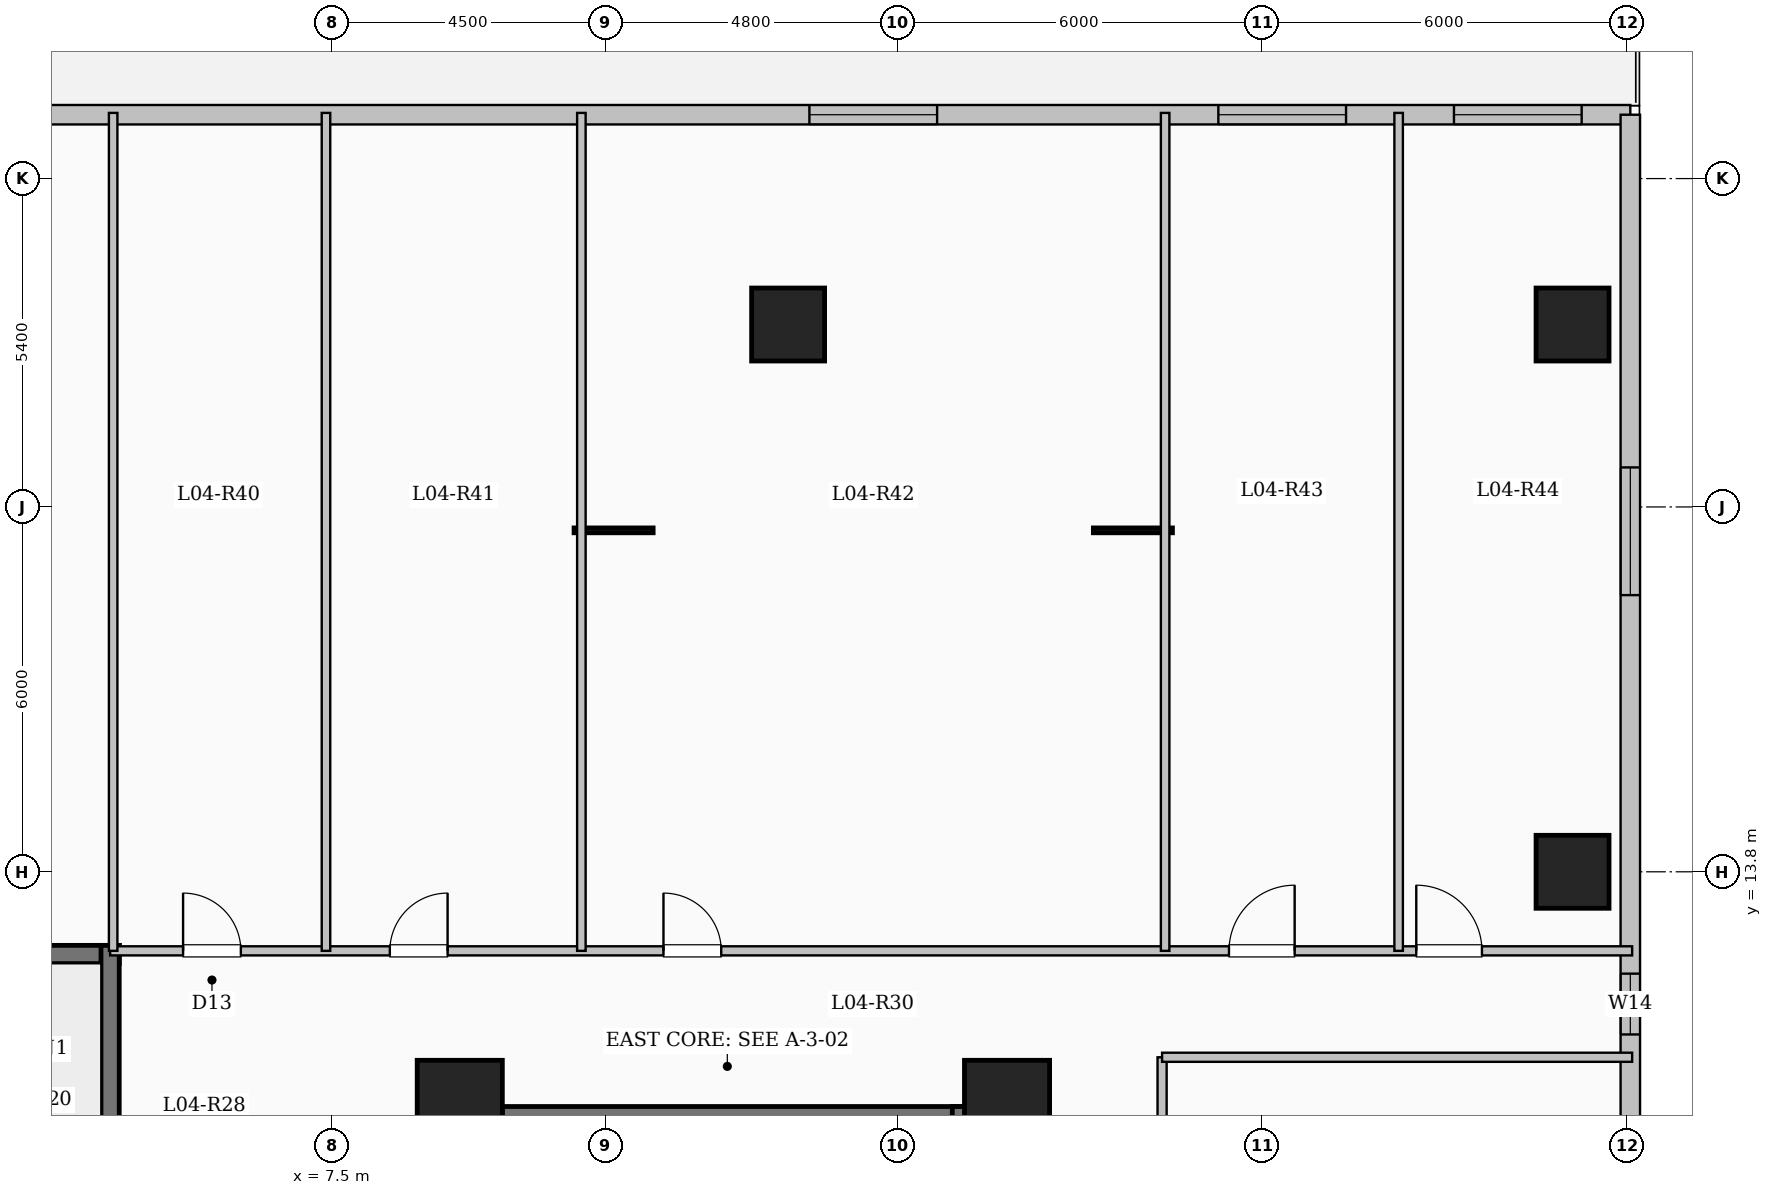
"""IFC4 building model, lengths in metres.
Left out: names, types, materials, properties, quantities, classifications, styles, units other than length and angle.
Written with IfcOpenShell. Run it as: python <this file> out.ifc"""

import sys

from ifc_helpers import new_model, si_unit, direction, frame, frame_2d, origin, origin_2d, place, context, subcontext, project, spatial, rectangle, extrude, element, fill, save


model = new_model("IFC4")
c1 = context("Model", 3, precision=1e-05, world=origin(), true_north=direction((0.0, 1.0)))
c2 = subcontext(c1, "Body", "Model", "MODEL_VIEW")
j1 = project(units=[si_unit("LENGTHUNIT", "METRE"), si_unit("PLANEANGLEUNIT", "RADIAN")], contexts=[c1])
p1 = place(None, origin())
s1 = spatial("IfcSite", under=j1, at=p1, CompositionType="ELEMENT")
p2 = place(p1, origin())
s2 = spatial("IfcBuilding", under=s1, at=p2, CompositionType="ELEMENT")
p3 = place(p2, frame((0.0, 0.0, 18.9)))
s3 = spatial("IfcBuildingStorey", under=s2, at=p3, CompositionType="ELEMENT", Elevation=18.9)
for number, where, z_axis, x_axis in (
    (1, (9.6, 10.0, 0.0), (0.0, 0.0, 1.0), (1.0, 0.0, 0.0)),
    (2, (18.6, 10.0, 0.0), (0.0, 0.0, 1.0), (1.0, 0.0, 0.0)),
):
    element("IfcColumn", number, at=place(p3, frame(where, z_axis=z_axis, x_axis=x_axis)), inside=s3, PredefinedType="COLUMN", context=c2, shape_type="SweptSolid", body=[
        extrude(rectangle(XDim=1.4, YDim=1.4, at=origin_2d()), origin(), (0.0, 0.0, 1.0), 5.1),
    ])
for number, where, z_axis, x_axis in (
    (3, (15.0, 22.8, 0.0), (0.0, 0.0, 1.0), (1.0, 0.0, 0.0)),
    (4, (27.9, 22.8, 0.0), (0.0, 0.0, 1.0), (1.0, 0.0, 0.0)),
    (5, (27.9, 13.8, 0.0), (0.0, 0.0, 1.0), (1.0, 0.0, 0.0)),
):
    element("IfcColumn", number, at=place(p3, frame(where, z_axis=z_axis, x_axis=x_axis)), inside=s3, PredefinedType="COLUMN", context=c2, shape_type="SweptSolid", body=[
        extrude(rectangle(XDim=1.2, YDim=1.2, at=origin_2d()), origin(), (0.0, 0.0, 1.0), 5.1),
    ])
p4 = place(p3, frame((-28.85, 26.25, 0.0), z_axis=(0.0, 0.0, 1.0), x_axis=(1.0, 0.0, 0.0)))
e6 = element("IfcWall", 6, at=p4, inside=s3, PredefinedType="SOLIDWALL", context=c2, shape_type="SweptSolid", body=[
    extrude(rectangle(XDim=57.7, YDim=0.32, at=frame_2d((28.85, 0.0))), origin(), (0.0, 0.0, 1.0), 4.85),
])
p5 = place(p4, frame((16.25, 0.0, 0.0)))
e7 = element("IfcOpeningElement", 7, at=p5, cuts=e6, PredefinedType="OPENING", context=c2, shape_type="SweptSolid", body=[
    extrude(rectangle(XDim=1.25, YDim=2.25, at=frame_2d((0.625, 1.125))), frame((0.0, 0.17, 0.0), z_axis=(0.0, -1.0, 0.0), x_axis=(1.0, 0.0, 0.0)), (0.0, 0.0, 1.0), 0.34),
])
p6 = place(p4, frame((7.18, 0.0, 0.9)))
e8 = element("IfcOpeningElement", 8, at=p6, cuts=e6, PredefinedType="OPENING", context=c2, shape_type="SweptSolid", body=[
    extrude(rectangle(XDim=2.1, YDim=2.0, at=frame_2d((1.05, 1.0))), frame((0.0, 0.17, 0.0), z_axis=(0.0, -1.0, 0.0), x_axis=(1.0, 0.0, 0.0)), (0.0, 0.0, 1.0), 0.34),
])
p7 = place(p4, frame((19.6, 0.0, 0.9)))
e9 = element("IfcOpeningElement", 9, at=p7, cuts=e6, PredefinedType="OPENING", context=c2, shape_type="SweptSolid", body=[
    extrude(rectangle(XDim=1.7, YDim=1.9, at=frame_2d((0.85, 0.95))), frame((0.0, 0.17, 0.0), z_axis=(0.0, -1.0, 0.0), x_axis=(1.0, 0.0, 0.0)), (0.0, 0.0, 1.0), 0.34),
])
p8 = place(p4, frame((22.625, 0.0, 0.9)))
e10 = element("IfcOpeningElement", 10, at=p8, cuts=e6, PredefinedType="OPENING", context=c2, shape_type="SweptSolid", body=[
    extrude(rectangle(XDim=1.7, YDim=1.9, at=frame_2d((0.85, 0.95))), frame((0.0, 0.17, 0.0), z_axis=(0.0, -1.0, 0.0), x_axis=(1.0, 0.0, 0.0)), (0.0, 0.0, 1.0), 0.34),
])
p9 = place(p4, frame((44.2, 0.0, 0.9)))
e11 = element("IfcOpeningElement", 11, at=p9, cuts=e6, PredefinedType="OPENING", context=c2, shape_type="SweptSolid", body=[
    extrude(rectangle(XDim=2.1, YDim=2.0, at=frame_2d((1.05, 1.0))), frame((0.0, 0.17, 0.0), z_axis=(0.0, -1.0, 0.0), x_axis=(1.0, 0.0, 0.0)), (0.0, 0.0, 1.0), 0.34),
])
p10 = place(p4, frame((50.925, 0.0, 0.9)))
e12 = element("IfcOpeningElement", 12, at=p10, cuts=e6, PredefinedType="OPENING", context=c2, shape_type="SweptSolid", body=[
    extrude(rectangle(XDim=2.1, YDim=2.0, at=frame_2d((1.05, 1.0))), frame((0.0, 0.17, 0.0), z_axis=(0.0, -1.0, 0.0), x_axis=(1.0, 0.0, 0.0)), (0.0, 0.0, 1.0), 0.34),
])
p11 = place(p4, frame((54.8, 0.0, 0.9)))
e13 = element("IfcOpeningElement", 13, at=p11, cuts=e6, PredefinedType="OPENING", context=c2, shape_type="SweptSolid", body=[
    extrude(rectangle(XDim=2.1, YDim=2.0, at=frame_2d((1.05, 1.0))), frame((0.0, 0.17, 0.0), z_axis=(0.0, -1.0, 0.0), x_axis=(1.0, 0.0, 0.0)), (0.0, 0.0, 1.0), 0.34),
])
p12 = place(p3, frame((28.85, 26.25, 0.0), z_axis=(0.0, 0.0, 1.0), x_axis=(0.0, -1.0, 0.0)))
e14 = element("IfcWall", 14, at=p12, inside=s3, PredefinedType="SOLIDWALL", context=c2, shape_type="SweptSolid", body=[
    extrude(rectangle(XDim=52.5, YDim=0.32, at=frame_2d((26.25, 0.0))), origin(), (0.0, 0.0, 1.0), 4.85),
])
p13 = place(p12, frame((5.8, 0.0, 0.9)))
e15 = element("IfcOpeningElement", 15, at=p13, cuts=e14, PredefinedType="OPENING", context=c2, shape_type="SweptSolid", body=[
    extrude(rectangle(XDim=2.1, YDim=2.0, at=frame_2d((1.05, 1.0))), frame((0.0, 0.17, 0.0), z_axis=(0.0, -1.0, 0.0), x_axis=(1.0, 0.0, 0.0)), (0.0, 0.0, 1.0), 0.34),
])
p14 = place(p12, frame((14.125, 0.0, 0.95)))
e16 = element("IfcOpeningElement", 16, at=p14, cuts=e14, PredefinedType="OPENING", context=c2, shape_type="SweptSolid", body=[
    extrude(rectangle(XDim=1.0, YDim=1.5, at=frame_2d((0.5, 0.75))), frame((0.0, 0.17, 0.0), z_axis=(0.0, -1.0, 0.0), x_axis=(1.0, 0.0, 0.0)), (0.0, 0.0, 1.0), 0.34),
])
p15 = place(p12, frame((23.45, 0.0, 0.9)))
e17 = element("IfcOpeningElement", 17, at=p15, cuts=e14, PredefinedType="OPENING", context=c2, shape_type="SweptSolid", body=[
    extrude(rectangle(XDim=2.1, YDim=2.0, at=frame_2d((1.05, 1.0))), frame((0.0, 0.17, 0.0), z_axis=(0.0, -1.0, 0.0), x_axis=(1.0, 0.0, 0.0)), (0.0, 0.0, 1.0), 0.34),
])
p16 = place(p12, frame((34.157, 0.0, 0.9)))
e18 = element("IfcOpeningElement", 18, at=p16, cuts=e14, PredefinedType="OPENING", context=c2, shape_type="SweptSolid", body=[
    extrude(rectangle(XDim=1.7, YDim=1.9, at=frame_2d((0.85, 0.95))), frame((0.0, 0.17, 0.0), z_axis=(0.0, -1.0, 0.0), x_axis=(1.0, 0.0, 0.0)), (0.0, 0.0, 1.0), 0.34),
])
p17 = place(p3, frame((10.0, 9.79, 0.0), z_axis=(0.0, 0.0, 1.0), x_axis=(1.0, 0.0, 0.0)))
e19 = element("IfcWall", 19, at=p17, inside=s3, PredefinedType="SHEAR", context=c2, shape_type="SweptSolid", body=[
    extrude(rectangle(XDim=8.0, YDim=0.3, at=frame_2d((4.0, 0.0))), origin(), (0.0, 0.0, 1.0), 5.1),
])
for number, where, z_axis, x_axis in (
    (20, (10.15, 6.35, 0.0), (0.0, 0.0, 1.0), (0.0, 1.0, 0.0)),
    (21, (17.85, 6.35, 0.0), (0.0, 0.0, 1.0), (0.0, 1.0, 0.0)),
):
    element("IfcWall", number, at=place(p3, frame(where, z_axis=z_axis, x_axis=x_axis)), inside=s3, PredefinedType="SHEAR", context=c2, shape_type="SweptSolid", body=[
        extrude(rectangle(XDim=3.59, YDim=0.3, at=frame_2d((1.795, 0.0))), origin(), (0.0, 0.0, 1.0), 5.1),
    ])
p18 = place(p3, frame((-4.0, 12.44, 0.0), z_axis=(0.0, 0.0, 1.0), x_axis=(1.0, 0.0, 0.0)))
e22 = element("IfcWall", 22, at=p18, inside=s3, PredefinedType="SHEAR", context=c2, shape_type="SweptSolid", body=[
    extrude(rectangle(XDim=8.0, YDim=0.3, at=frame_2d((4.0, 0.0))), origin(), (0.0, 0.0, 1.0), 5.1),
])
p19 = place(p3, frame((3.85, 9.0, 0.0), z_axis=(0.0, 0.0, 1.0), x_axis=(0.0, 1.0, 0.0)))
e23 = element("IfcWall", 23, at=p19, inside=s3, PredefinedType="SHEAR", context=c2, shape_type="SweptSolid", body=[
    extrude(rectangle(XDim=3.59, YDim=0.3, at=frame_2d((1.795, 0.0))), origin(), (0.0, 0.0, 1.0), 5.1),
])
p20 = place(p3, frame((3.85, 12.5, 0.0), z_axis=(0.0, 0.0, 1.0), x_axis=(1.0, 0.0, 0.0)))
e24 = element("IfcWall", 24, at=p20, inside=s3, PredefinedType="PARTITIONING", context=c2, shape_type="SweptSolid", body=[
    extrude(rectangle(XDim=25.03, YDim=0.15, at=frame_2d((12.515, 0.0))), origin(), (0.0, 0.0, 1.0), 4.85),
])
p21 = place(p20, frame((1.2, 0.0, 0.0)))
e25 = element("IfcOpeningElement", 25, at=p21, cuts=e24, PredefinedType="OPENING", context=c2, shape_type="SweptSolid", body=[
    extrude(rectangle(XDim=0.95, YDim=2.15, at=frame_2d((0.475, 1.075))), frame((0.0, 0.085, 0.0), z_axis=(0.0, -1.0, 0.0), x_axis=(1.0, 0.0, 0.0)), (0.0, 0.0, 1.0), 0.17),
])
p22 = place(p20, frame((4.6, 0.0, 0.0)))
e26 = element("IfcOpeningElement", 26, at=p22, cuts=e24, PredefinedType="OPENING", context=c2, shape_type="SweptSolid", body=[
    extrude(rectangle(XDim=0.95, YDim=2.15, at=frame_2d((0.475, 1.075))), frame((0.0, 0.085, 0.0), z_axis=(0.0, -1.0, 0.0), x_axis=(1.0, 0.0, 0.0)), (0.0, 0.0, 1.0), 0.17),
])
p23 = place(p20, frame((9.1, 0.0, 0.0)))
e27 = element("IfcOpeningElement", 27, at=p23, cuts=e24, PredefinedType="OPENING", context=c2, shape_type="SweptSolid", body=[
    extrude(rectangle(XDim=0.95, YDim=2.15, at=frame_2d((0.475, 1.075))), frame((0.0, 0.085, 0.0), z_axis=(0.0, -1.0, 0.0), x_axis=(1.0, 0.0, 0.0)), (0.0, 0.0, 1.0), 0.17),
])
p24 = place(p20, frame((18.4, 0.0, 0.0)))
e28 = element("IfcOpeningElement", 28, at=p24, cuts=e24, PredefinedType="OPENING", context=c2, shape_type="SweptSolid", body=[
    extrude(rectangle(XDim=1.08, YDim=2.15, at=frame_2d((0.54, 1.075))), frame((0.0, 0.085, 0.0), z_axis=(0.0, -1.0, 0.0), x_axis=(1.0, 0.0, 0.0)), (0.0, 0.0, 1.0), 0.17),
])
p25 = place(p20, frame((21.48, 0.0, 0.0)))
e29 = element("IfcOpeningElement", 29, at=p25, cuts=e24, PredefinedType="OPENING", context=c2, shape_type="SweptSolid", body=[
    extrude(rectangle(XDim=1.08, YDim=2.15, at=frame_2d((0.54, 1.075))), frame((0.0, 0.085, 0.0), z_axis=(0.0, -1.0, 0.0), x_axis=(1.0, 0.0, 0.0)), (0.0, 0.0, 1.0), 0.17),
])
p26 = place(p3, frame((21.15, -7.25, 0.0), z_axis=(0.0, 0.0, 1.0), x_axis=(0.0, 1.0, 0.0)))
e30 = element("IfcWall", 30, at=p26, inside=s3, PredefinedType="PARTITIONING", context=c2, shape_type="SweptSolid", body=[
    extrude(rectangle(XDim=18.0, YDim=0.15, at=frame_2d((9.0, 0.0))), origin(), (0.0, 0.0, 1.0), 4.85),
])
for number, where, z_axis, x_axis in (
    (31, (3.9, 12.5, 0.0), (0.0, 0.0, 1.0), (0.0, 1.0, 0.0)),
    (32, (7.4, 12.5, 0.0), (0.0, 0.0, 1.0), (0.0, 1.0, 0.0)),
    (33, (11.6, 12.5, 0.0), (0.0, 0.0, 1.0), (0.0, 1.0, 0.0)),
    (34, (21.2, 12.5, 0.0), (0.0, 0.0, 1.0), (0.0, 1.0, 0.0)),
    (35, (25.04, 12.5, 0.0), (0.0, 0.0, 1.0), (0.0, 1.0, 0.0)),
):
    element("IfcWall", number, at=place(p3, frame(where, z_axis=z_axis, x_axis=x_axis)), inside=s3, PredefinedType="PARTITIONING", context=c2, shape_type="SweptSolid", body=[
        extrude(rectangle(XDim=13.78, YDim=0.14, at=frame_2d((6.89, 0.0))), origin(), (0.0, 0.0, 1.0), 4.85),
    ])
p27 = place(p3, frame((21.15, 10.75, 0.0), z_axis=(0.0, 0.0, 1.0), x_axis=(1.0, 0.0, 0.0)))
e36 = element("IfcWall", 36, at=p27, inside=s3, PredefinedType="PARTITIONING", context=c2, shape_type="SweptSolid", body=[
    extrude(rectangle(XDim=7.73, YDim=0.15, at=frame_2d((3.865, 0.0))), origin(), (0.0, 0.0, 1.0), 4.85),
])
p28 = place(p9, origin())
e37 = element("IfcWindow", 37, at=p28, inside=s3, PartitioningType="SINGLE_PANEL", PredefinedType="WINDOW", context=c2, shape_type="SweptSolid", body=[
    extrude(rectangle(XDim=2.1, YDim=2.0, at=frame_2d((1.05, 1.0))), frame((0.0, 0.03, 0.0), z_axis=(0.0, -1.0, 0.0), x_axis=(1.0, 0.0, 0.0)), (0.0, 0.0, 1.0), 0.06),
])
fill(e11, e37)
p29 = place(p10, origin())
e38 = element("IfcWindow", 38, at=p29, inside=s3, PartitioningType="SINGLE_PANEL", PredefinedType="WINDOW", context=c2, shape_type="SweptSolid", body=[
    extrude(rectangle(XDim=2.1, YDim=2.0, at=frame_2d((1.05, 1.0))), frame((0.0, 0.03, 0.0), z_axis=(0.0, -1.0, 0.0), x_axis=(1.0, 0.0, 0.0)), (0.0, 0.0, 1.0), 0.06),
])
fill(e12, e38)
p30 = place(p11, origin())
e39 = element("IfcWindow", 39, at=p30, inside=s3, PartitioningType="SINGLE_PANEL", PredefinedType="WINDOW", context=c2, shape_type="SweptSolid", body=[
    extrude(rectangle(XDim=2.1, YDim=2.0, at=frame_2d((1.05, 1.0))), frame((0.0, 0.03, 0.0), z_axis=(0.0, -1.0, 0.0), x_axis=(1.0, 0.0, 0.0)), (0.0, 0.0, 1.0), 0.06),
])
fill(e13, e39)
p31 = place(p13, origin())
e40 = element("IfcWindow", 40, at=p31, inside=s3, PartitioningType="SINGLE_PANEL", PredefinedType="WINDOW", context=c2, shape_type="SweptSolid", body=[
    extrude(rectangle(XDim=2.1, YDim=2.0, at=frame_2d((1.05, 1.0))), frame((0.0, 0.03, 0.0), z_axis=(0.0, -1.0, 0.0), x_axis=(1.0, 0.0, 0.0)), (0.0, 0.0, 1.0), 0.06),
])
fill(e15, e40)
p32 = place(p14, origin())
e41 = element("IfcWindow", 41, at=p32, inside=s3, PartitioningType="SINGLE_PANEL", PredefinedType="WINDOW", context=c2, shape_type="SweptSolid", body=[
    extrude(rectangle(XDim=1.0, YDim=1.5, at=frame_2d((0.5, 0.75))), frame((0.0, 0.03, 0.0), z_axis=(0.0, -1.0, 0.0), x_axis=(1.0, 0.0, 0.0)), (0.0, 0.0, 1.0), 0.06),
])
fill(e16, e41)
p33 = place(p21, origin())
e42 = element("IfcDoor", 42, at=p33, inside=s3, OperationType="SINGLE_SWING_LEFT", PredefinedType="DOOR", context=c2, shape_type="SweptSolid", body=[
    extrude(rectangle(XDim=0.95, YDim=2.15, at=frame_2d((0.475, 1.075))), frame((0.0, 0.025, 0.0), z_axis=(0.0, -1.0, 0.0), x_axis=(1.0, 0.0, 0.0)), (0.0, 0.0, 1.0), 0.05),
])
fill(e25, e42)
p34 = place(p22, origin())
e43 = element("IfcDoor", 43, at=p34, inside=s3, OperationType="SINGLE_SWING_RIGHT", PredefinedType="DOOR", context=c2, shape_type="SweptSolid", body=[
    extrude(rectangle(XDim=0.95, YDim=2.15, at=frame_2d((0.475, 1.075))), frame((0.0, 0.025, 0.0), z_axis=(0.0, -1.0, 0.0), x_axis=(1.0, 0.0, 0.0)), (0.0, 0.0, 1.0), 0.05),
])
fill(e26, e43)
p35 = place(p23, origin())
e44 = element("IfcDoor", 44, at=p35, inside=s3, OperationType="SINGLE_SWING_LEFT", PredefinedType="DOOR", context=c2, shape_type="SweptSolid", body=[
    extrude(rectangle(XDim=0.95, YDim=2.15, at=frame_2d((0.475, 1.075))), frame((0.0, 0.025, 0.0), z_axis=(0.0, -1.0, 0.0), x_axis=(1.0, 0.0, 0.0)), (0.0, 0.0, 1.0), 0.05),
])
fill(e27, e44)
p36 = place(p24, origin())
e45 = element("IfcDoor", 45, at=p36, inside=s3, OperationType="SINGLE_SWING_RIGHT", PredefinedType="DOOR", context=c2, shape_type="SweptSolid", body=[
    extrude(rectangle(XDim=1.08, YDim=2.15, at=frame_2d((0.54, 1.075))), frame((0.0, 0.025, 0.0), z_axis=(0.0, -1.0, 0.0), x_axis=(1.0, 0.0, 0.0)), (0.0, 0.0, 1.0), 0.05),
])
fill(e28, e45)
p37 = place(p25, origin())
e46 = element("IfcDoor", 46, at=p37, inside=s3, OperationType="SINGLE_SWING_LEFT", PredefinedType="DOOR", context=c2, shape_type="SweptSolid", body=[
    extrude(rectangle(XDim=1.08, YDim=2.15, at=frame_2d((0.54, 1.075))), frame((0.0, 0.025, 0.0), z_axis=(0.0, -1.0, 0.0), x_axis=(1.0, 0.0, 0.0)), (0.0, 0.0, 1.0), 0.05),
])
fill(e29, e46)
save(model, sys.argv[1])
